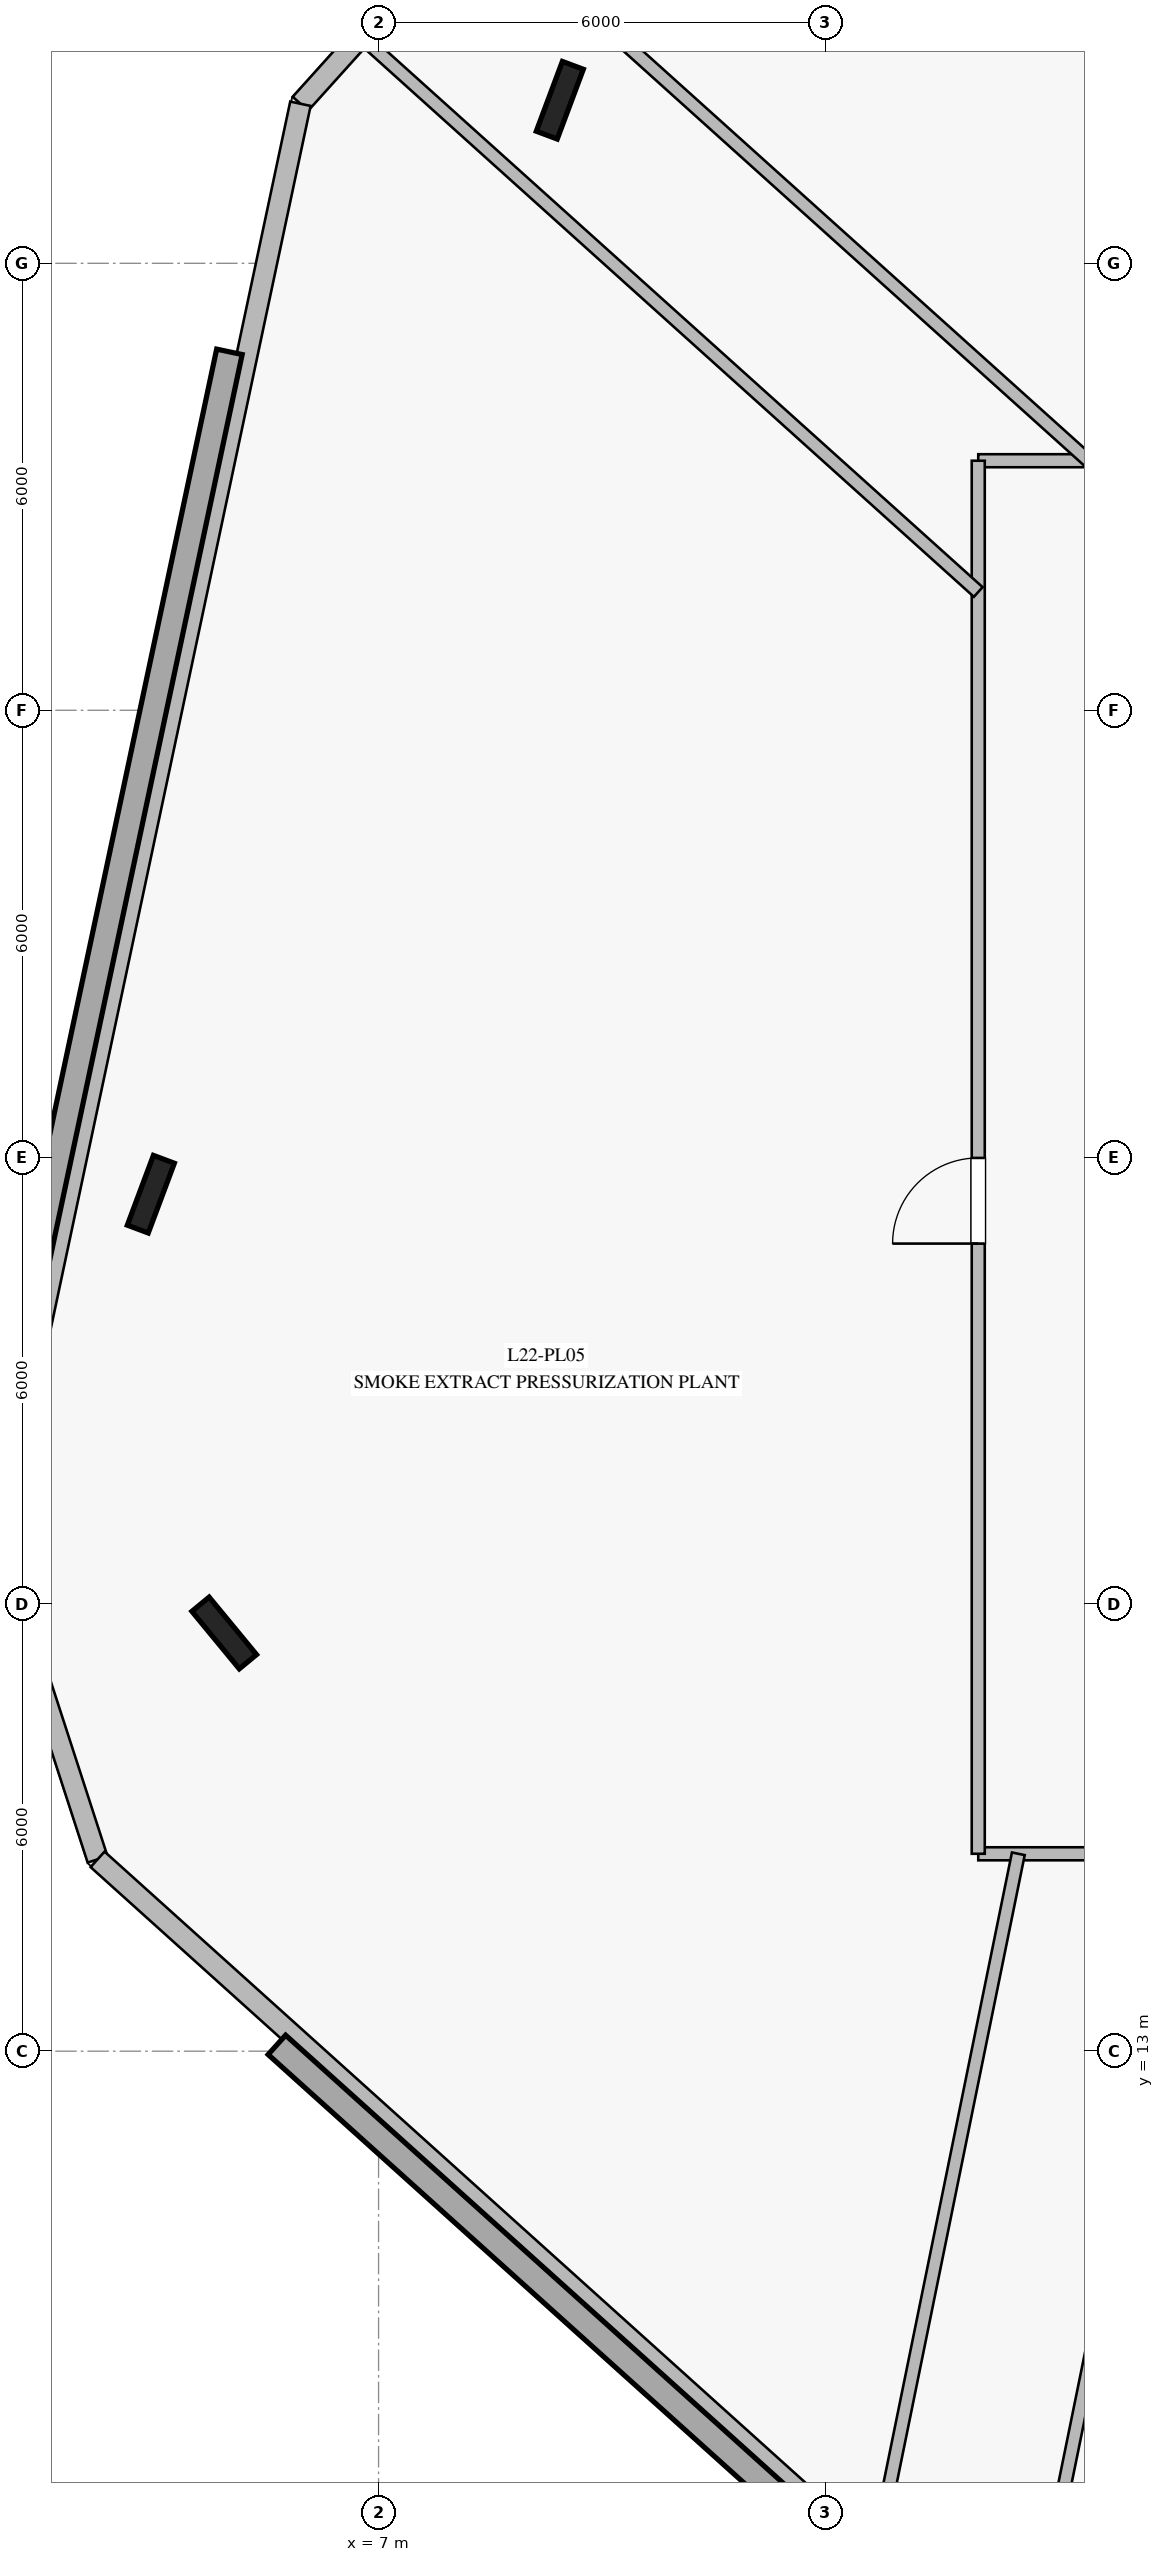
"""IFC4 building model, lengths in metres.
Left out: names, types, materials, properties, quantities, classifications, styles, units other than length and angle.
Written with IfcOpenShell. Run it as: python <this file> out.ifc"""

import sys

from ifc_helpers import new_model, si_unit, direction, frame, frame_2d, origin, origin_2d, place, context, subcontext, project, spatial, rectangle, i_section, extrude, element, fill, save


model = new_model("IFC4")
c1 = context("Model", 3, precision=1e-05, world=origin(), true_north=direction((0.0, 1.0)))
c2 = subcontext(c1, "Body", "Model", "MODEL_VIEW")
j1 = project(units=[si_unit("LENGTHUNIT", "METRE"), si_unit("PLANEANGLEUNIT", "RADIAN")], contexts=[c1])
p1 = place(None, origin())
s1 = spatial("IfcSite", under=j1, at=p1, CompositionType="ELEMENT")
p2 = place(p1, origin())
s2 = spatial("IfcBuilding", under=s1, at=p2, CompositionType="ELEMENT")
p3 = place(p2, frame((0.0, 0.0, 92.0)))
s3 = spatial("IfcBuildingStorey", under=s2, at=p3, CompositionType="ELEMENT", Elevation=92.0)
for number, where, z_axis, x_axis in (
    (1, (9.433, 39.189, 0.0), (0.0, 0.0, 1.0), (0.35, 0.937, 0.0)),
    (2, (3.943, 24.504, 0.0), (0.0, 0.0, 1.0), (0.35, 0.937, 0.0)),
    (3, (4.928, 18.614, 0.0), (0.0, 0.0, 1.0), (-0.636, 0.772, 0.0)),
):
    element("IfcColumn", number, at=place(p3, frame(where, z_axis=z_axis, x_axis=x_axis)), inside=s3, PredefinedType="COLUMN", context=c2, shape_type="SweptSolid", body=[
        extrude(i_section(OverallWidth=0.3, OverallDepth=1.0, WebThickness=0.019, FlangeThickness=0.036, at=origin_2d()), origin(), (0.0, 0.0, 1.0), 5.4),
    ])
p4 = place(p3, frame((8.945, 42.466, 0.0), z_axis=(0.0, 0.0, 1.0), x_axis=(-0.669281253692, -0.743009154356, 0.0)))
e4 = element("IfcWall", 4, at=p4, inside=s3, PredefinedType="STANDARD", context=c2, shape_type="SweptSolid", body=[
    extrude(rectangle(XDim=4.474, YDim=0.28, at=frame_2d((2.237, 0.0))), origin(), (0.0, 0.0, 1.0), 5.14),
])
p5 = place(p3, frame((5.951, 39.142, 0.0), z_axis=(0.0, 0.0, 1.0), x_axis=(-0.207858460047, -0.97815891377, 0.0)))
e5 = element("IfcWall", 5, at=p5, inside=s3, PredefinedType="STANDARD", context=c2, shape_type="SweptSolid", body=[
    extrude(rectangle(XDim=19.744, YDim=0.28, at=frame_2d((9.872, 0.0))), origin(), (0.0, 0.0, 1.0), 5.14),
])
p6 = place(p3, frame((1.847, 19.829, 0.0), z_axis=(0.0, 0.0, 1.0), x_axis=(0.308783667438, -0.951132297172, 0.0)))
e6 = element("IfcWall", 6, at=p6, inside=s3, PredefinedType="STANDARD", context=c2, shape_type="SweptSolid", body=[
    extrude(rectangle(XDim=4.473, YDim=0.28, at=frame_2d((2.236, 0.0))), origin(), (0.0, 0.0, 1.0), 5.14),
])
p7 = place(p3, frame((3.228, 15.575, 0.0), z_axis=(0.0, 0.0, 1.0), x_axis=(0.743161948842, -0.669111588446, 0.0)))
e7 = element("IfcWall", 7, at=p7, inside=s3, PredefinedType="STANDARD", context=c2, shape_type="SweptSolid", body=[
    extrude(rectangle(XDim=19.745, YDim=0.28, at=frame_2d((9.873, 0.0))), origin(), (0.0, 0.0, 1.0), 5.14),
])
p8 = place(p3, frame((15.05, 34.35, 0.0), z_axis=(0.0, 0.0, 1.0), x_axis=(1.0, 0.0, 0.0)))
e8 = element("IfcWall", 8, at=p8, inside=s3, PredefinedType="PARTITIONING", context=c2, shape_type="SweptSolid", body=[
    extrude(rectangle(XDim=19.9, YDim=0.175, at=frame_2d((9.95, 0.0))), origin(), (0.0, 0.0, 1.0), 3.54),
])
p9 = place(p8, frame((12.826, 0.0, 0.0)))
e9 = element("IfcOpeningElement", 9, at=p9, cuts=e8, PredefinedType="OPENING", context=c2, shape_type="SweptSolid", body=[
    extrude(rectangle(XDim=1.15, YDim=2.2, at=frame_2d((0.575, 1.1))), frame((0.0, 0.098, 0.0), z_axis=(0.0, -1.0, 0.0), x_axis=(1.0, 0.0, 0.0)), (0.0, 0.0, 1.0), 0.195),
])
p10 = place(p8, frame((5.085, 0.0, 0.0)))
e10 = element("IfcOpeningElement", 10, at=p10, cuts=e8, PredefinedType="OPENING", context=c2, shape_type="SweptSolid", body=[
    extrude(rectangle(XDim=1.15, YDim=2.2, at=frame_2d((0.575, 1.1))), frame((0.0, 0.098, 0.0), z_axis=(0.0, -1.0, 0.0), x_axis=(1.0, 0.0, 0.0)), (0.0, 0.0, 1.0), 0.195),
])
p11 = place(p3, frame((34.95, 15.65, 0.0), z_axis=(0.0, 0.0, 1.0), x_axis=(-1.0, 0.0, 0.0)))
e11 = element("IfcWall", 11, at=p11, inside=s3, PredefinedType="PARTITIONING", context=c2, shape_type="SweptSolid", body=[
    extrude(rectangle(XDim=19.9, YDim=0.175, at=frame_2d((9.95, 0.0))), origin(), (0.0, 0.0, 1.0), 3.54),
])
p12 = place(p11, frame((8.511, 0.0, 0.0)))
e12 = element("IfcOpeningElement", 12, at=p12, cuts=e11, PredefinedType="OPENING", context=c2, shape_type="SweptSolid", body=[
    extrude(rectangle(XDim=1.2, YDim=2.25, at=frame_2d((0.6, 1.125))), frame((0.0, 0.098, 0.0), z_axis=(0.0, -1.0, 0.0), x_axis=(1.0, 0.0, 0.0)), (0.0, 0.0, 1.0), 0.195),
])
p13 = place(p3, frame((15.05, 15.65, 0.0), z_axis=(0.0, 0.0, 1.0), x_axis=(0.0, 1.0, 0.0)))
e13 = element("IfcWall", 13, at=p13, inside=s3, PredefinedType="PARTITIONING", context=c2, shape_type="SweptSolid", body=[
    extrude(rectangle(XDim=18.7, YDim=0.175, at=frame_2d((9.35, 0.0))), origin(), (0.0, 0.0, 1.0), 3.54),
])
p14 = place(p13, frame((8.191, 0.0, 0.0)))
e14 = element("IfcOpeningElement", 14, at=p14, cuts=e13, PredefinedType="OPENING", context=c2, shape_type="SweptSolid", body=[
    extrude(rectangle(XDim=1.15, YDim=2.2, at=frame_2d((0.575, 1.1))), frame((0.0, 0.098, 0.0), z_axis=(0.0, -1.0, 0.0), x_axis=(1.0, 0.0, 0.0)), (0.0, 0.0, 1.0), 0.195),
])
p15 = place(p3, frame((15.588, 15.65, 0.0), z_axis=(0.0, 0.0, 1.0), x_axis=(-0.199614906569, -0.979874425156, 0.0)))
e15 = element("IfcWall", 15, at=p15, inside=s3, PredefinedType="PARTITIONING", context=c2, shape_type="SweptSolid", body=[
    extrude(rectangle(XDim=9.578, YDim=0.175, at=frame_2d((4.789, 0.0))), origin(), (0.0, 0.0, 1.0), 3.53),
])
p16 = place(p3, frame((17.936, 15.65, 0.0), z_axis=(0.0, 0.0, 1.0), x_axis=(-0.199652459502, -0.979866774319, 0.0)))
e16 = element("IfcWall", 16, at=p16, inside=s3, PredefinedType="PARTITIONING", context=c2, shape_type="SweptSolid", body=[
    extrude(rectangle(XDim=11.4, YDim=0.175, at=frame_2d((5.7, 0.0))), origin(), (0.0, 0.0, 1.0), 3.53),
])
p17 = place(p3, frame((16.53, 34.35, 0.0), z_axis=(0.0, 0.0, 1.0), x_axis=(-0.743388992032, 0.66885933239, 0.0)))
e17 = element("IfcWall", 17, at=p17, inside=s3, PredefinedType="PARTITIONING", context=c2, shape_type="SweptSolid", body=[
    extrude(rectangle(XDim=11.007, YDim=0.175, at=frame_2d((5.503, 0.0))), origin(), (0.0, 0.0, 1.0), 3.53),
])
p18 = place(p3, frame((15.05, 32.588, 0.0), z_axis=(0.0, 0.0, 1.0), x_axis=(-0.743376269503, 0.668873472295, 0.0)))
e18 = element("IfcWall", 18, at=p18, inside=s3, PredefinedType="PARTITIONING", context=c2, shape_type="SweptSolid", body=[
    extrude(rectangle(XDim=11.086, YDim=0.175, at=frame_2d((5.543, 0.0))), origin(), (0.0, 0.0, 1.0), 3.53),
])
p19 = place(p14, origin())
e19 = element("IfcDoor", 19, at=p19, inside=s3, OperationType="SINGLE_SWING_LEFT", PredefinedType="DOOR", context=c2, shape_type="SweptSolid", body=[
    extrude(rectangle(XDim=1.15, YDim=2.2, at=frame_2d((0.575, 1.1))), frame((0.0, 0.025, 0.0), z_axis=(0.0, -1.0, 0.0), x_axis=(1.0, 0.0, 0.0)), (0.0, 0.0, 1.0), 0.05),
])
fill(e14, e19)
save(model, sys.argv[1])
